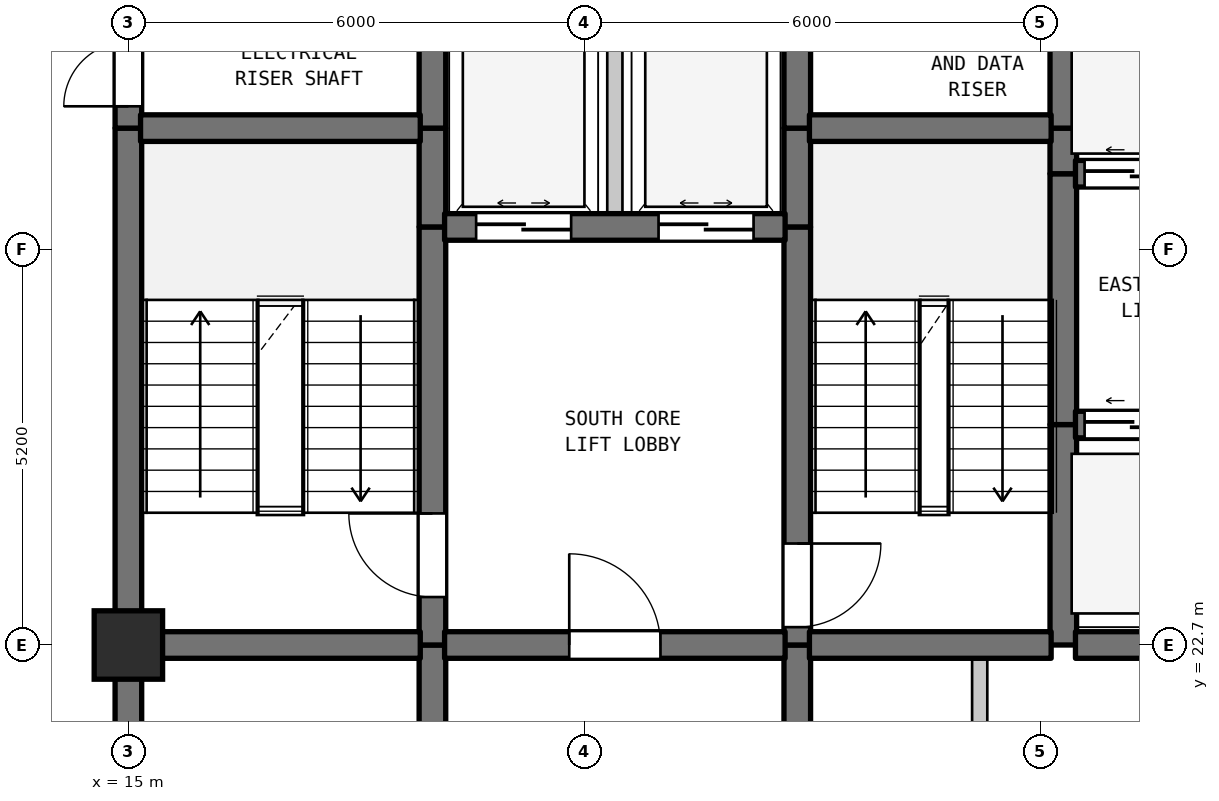
"""IFC4 building model, lengths in metres.
Left out: names, types, materials, properties, quantities, classifications, styles, units other than length and angle.
Written with IfcOpenShell. Run it as: python <this file> out.ifc"""

import sys

from ifc_helpers import new_model, si_unit, direction, frame, frame_2d, origin, origin_2d, place, context, subcontext, project, spatial, rectangle, extrude, element, fill, save


model = new_model("IFC4")
c1 = context("Model", 3, precision=1e-05, world=origin(), true_north=direction((0.0, 1.0)))
c2 = subcontext(c1, "Body", "Model", "MODEL_VIEW")
j1 = project(units=[si_unit("LENGTHUNIT", "METRE"), si_unit("PLANEANGLEUNIT", "RADIAN")], contexts=[c1])
p1 = place(None, origin())
s1 = spatial("IfcSite", under=j1, at=p1, CompositionType="ELEMENT")
p2 = place(p1, origin())
s2 = spatial("IfcBuilding", under=s1, at=p2, CompositionType="ELEMENT")
p3 = place(p2, frame((0.0, 0.0, 144.6)))
s3 = spatial("IfcBuildingStorey", under=s2, at=p3, CompositionType="ELEMENT", Elevation=144.6)
p4 = place(p3, frame((15.0, 22.7, 0.0), z_axis=(0.0, 0.0, 1.0), x_axis=(1.0, 0.0, 0.0)))
e1 = element("IfcColumn", 1, at=p4, inside=s3, PredefinedType="COLUMN", context=c2, shape_type="SweptSolid", body=[
    extrude(rectangle(XDim=0.9, YDim=0.9, at=origin_2d()), origin(), (0.0, 0.0, 1.0), 3.7),
])
p5 = place(p3, frame((15.0, 19.5, 0.0), z_axis=(0.0, 0.0, 1.0), x_axis=(0.0, 1.0, 0.0)))
e2 = element("IfcWall", 2, at=p5, inside=s3, PredefinedType="SHEAR", context=c2, shape_type="SweptSolid", body=[
    extrude(rectangle(XDim=3.2, YDim=0.35, at=frame_2d((1.6, 0.0))), origin(), (0.0, 0.0, 1.0), 3.385),
])
p6 = place(p3, frame((15.0, 22.7, 0.0), z_axis=(0.0, 0.0, 1.0), x_axis=(0.0, 1.0, 0.0)))
e3 = element("IfcWall", 3, at=p6, inside=s3, PredefinedType="SHEAR", context=c2, shape_type="SweptSolid", body=[
    extrude(rectangle(XDim=6.8, YDim=0.35, at=frame_2d((3.4, 0.0))), origin(), (0.0, 0.0, 1.0), 3.385),
])
p7 = place(p3, frame((15.0, 29.5, 0.0), z_axis=(0.0, 0.0, 1.0), x_axis=(0.0, 1.0, 0.0)))
e4 = element("IfcWall", 4, at=p7, inside=s3, PredefinedType="SHEAR", context=c2, shape_type="SweptSolid", body=[
    extrude(rectangle(XDim=1.6, YDim=0.35, at=frame_2d((0.8, 0.0))), origin(), (0.0, 0.0, 1.0), 3.385),
])
p8 = place(p7, frame((0.287, 0.0, 0.0)))
e5 = element("IfcOpeningElement", 5, at=p8, cuts=e4, PredefinedType="OPENING", context=c2, shape_type="SweptSolid", body=[
    extrude(rectangle(XDim=0.85, YDim=2.1, at=frame_2d((0.425, 1.05))), frame((0.0, 0.185, 0.0), z_axis=(0.0, -1.0, 0.0), x_axis=(1.0, 0.0, 0.0)), (0.0, 0.0, 1.0), 0.37),
])
p9 = place(p3, frame((19.0, 19.5, 0.0), z_axis=(0.0, 0.0, 1.0), x_axis=(0.0, 1.0, 0.0)))
e6 = element("IfcWall", 6, at=p9, inside=s3, PredefinedType="SHEAR", context=c2, shape_type="SweptSolid", body=[
    extrude(rectangle(XDim=3.2, YDim=0.35, at=frame_2d((1.6, 0.0))), origin(), (0.0, 0.0, 1.0), 3.385),
])
p10 = place(p3, frame((19.0, 22.7, 0.0), z_axis=(0.0, 0.0, 1.0), x_axis=(0.0, 1.0, 0.0)))
e7 = element("IfcWall", 7, at=p10, inside=s3, PredefinedType="SHEAR", context=c2, shape_type="SweptSolid", body=[
    extrude(rectangle(XDim=5.5, YDim=0.35, at=frame_2d((2.75, 0.0))), origin(), (0.0, 0.0, 1.0), 3.385),
])
p11 = place(p10, frame((0.631, 0.0, 0.0)))
e8 = element("IfcOpeningElement", 8, at=p11, cuts=e7, PredefinedType="OPENING", context=c2, shape_type="SweptSolid", body=[
    extrude(rectangle(XDim=1.1, YDim=2.15, at=frame_2d((0.55, 1.075))), frame((0.0, 0.185, 0.0), z_axis=(0.0, -1.0, 0.0), x_axis=(1.0, 0.0, 0.0)), (0.0, 0.0, 1.0), 0.37),
])
p12 = place(p3, frame((19.0, 28.2, 0.0), z_axis=(0.0, 0.0, 1.0), x_axis=(0.0, 1.0, 0.0)))
e9 = element("IfcWall", 9, at=p12, inside=s3, PredefinedType="SHEAR", context=c2, shape_type="SweptSolid", body=[
    extrude(rectangle(XDim=1.3, YDim=0.35, at=frame_2d((0.65, 0.0))), origin(), (0.0, 0.0, 1.0), 3.385),
])
p13 = place(p3, frame((19.0, 29.5, 0.0), z_axis=(0.0, 0.0, 1.0), x_axis=(0.0, 1.0, 0.0)))
e10 = element("IfcWall", 10, at=p13, inside=s3, PredefinedType="SHEAR", context=c2, shape_type="SweptSolid", body=[
    extrude(rectangle(XDim=5.5, YDim=0.35, at=frame_2d((2.75, 0.0))), origin(), (0.0, 0.0, 1.0), 3.385),
])
p14 = place(p13, frame((2.025, 0.0, 0.0)))
e11 = element("IfcOpeningElement", 11, at=p14, cuts=e10, PredefinedType="OPENING", context=c2, shape_type="SweptSolid", body=[
    extrude(rectangle(XDim=1.1, YDim=2.15, at=frame_2d((0.55, 1.075))), frame((0.0, 0.185, 0.0), z_axis=(0.0, -1.0, 0.0), x_axis=(1.0, 0.0, 0.0)), (0.0, 0.0, 1.0), 0.37),
])
p15 = place(p3, frame((21.4, 28.2, 0.0), z_axis=(0.0, 0.0, 1.0), x_axis=(0.0, 1.0, 0.0)))
e12 = element("IfcWall", 12, at=p15, inside=s3, PredefinedType="STANDARD", context=c2, shape_type="SweptSolid", body=[
    extrude(rectangle(XDim=2.6, YDim=0.2, at=frame_2d((1.3, 0.0))), origin(), (0.0, 0.0, 1.0), 3.385),
])
p16 = place(p3, frame((23.8, 19.5, 0.0), z_axis=(0.0, 0.0, 1.0), x_axis=(0.0, 1.0, 0.0)))
e13 = element("IfcWall", 13, at=p16, inside=s3, PredefinedType="SHEAR", context=c2, shape_type="SweptSolid", body=[
    extrude(rectangle(XDim=3.2, YDim=0.35, at=frame_2d((1.6, 0.0))), origin(), (0.0, 0.0, 1.0), 3.385),
])
p17 = place(p3, frame((23.8, 22.7, 0.0), z_axis=(0.0, 0.0, 1.0), x_axis=(0.0, 1.0, 0.0)))
e14 = element("IfcWall", 14, at=p17, inside=s3, PredefinedType="SHEAR", context=c2, shape_type="SweptSolid", body=[
    extrude(rectangle(XDim=5.5, YDim=0.35, at=frame_2d((2.75, 0.0))), origin(), (0.0, 0.0, 1.0), 3.385),
])
p18 = place(p17, frame((0.235, 0.0, 0.0)))
e15 = element("IfcOpeningElement", 15, at=p18, cuts=e14, PredefinedType="OPENING", context=c2, shape_type="SweptSolid", body=[
    extrude(rectangle(XDim=1.1, YDim=2.15, at=frame_2d((0.55, 1.075))), frame((0.0, 0.185, 0.0), z_axis=(0.0, -1.0, 0.0), x_axis=(1.0, 0.0, 0.0)), (0.0, 0.0, 1.0), 0.37),
])
for number, where, z_axis, x_axis in (
    (16, (23.8, 28.2, 0.0), (0.0, 0.0, 1.0), (0.0, 1.0, 0.0)),
    (17, (23.8, 29.5, 0.0), (0.0, 0.0, 1.0), (0.0, 1.0, 0.0)),
):
    element("IfcWall", number, at=place(p3, frame(where, z_axis=z_axis, x_axis=x_axis)), inside=s3, PredefinedType="SHEAR", context=c2, shape_type="SweptSolid", body=[
        extrude(rectangle(XDim=1.3, YDim=0.35, at=frame_2d((0.65, 0.0))), origin(), (0.0, 0.0, 1.0), 3.385),
    ])
p19 = place(p3, frame((26.2, 19.5, 0.0), z_axis=(0.0, 0.0, 1.0), x_axis=(0.0, 1.0, 0.0)))
e18 = element("IfcWall", 18, at=p19, inside=s3, PredefinedType="STANDARD", context=c2, shape_type="SweptSolid", body=[
    extrude(rectangle(XDim=3.2, YDim=0.2, at=frame_2d((1.6, 0.0))), origin(), (0.0, 0.0, 1.0), 3.385),
])
p20 = place(p3, frame((27.3, 22.7, 0.0), z_axis=(0.0, 0.0, 1.0), x_axis=(0.0, 1.0, 0.0)))
e19 = element("IfcWall", 19, at=p20, inside=s3, PredefinedType="SHEAR", context=c2, shape_type="SweptSolid", body=[
    extrude(rectangle(XDim=2.9, YDim=0.35, at=frame_2d((1.45, 0.0))), origin(), (0.0, 0.0, 1.0), 3.385),
])
p21 = place(p3, frame((27.3, 25.6, 0.0), z_axis=(0.0, 0.0, 1.0), x_axis=(0.0, 1.0, 0.0)))
e20 = element("IfcWall", 20, at=p21, inside=s3, PredefinedType="SHEAR", context=c2, shape_type="SweptSolid", body=[
    extrude(rectangle(XDim=3.3, YDim=0.35, at=frame_2d((1.65, 0.0))), origin(), (0.0, 0.0, 1.0), 3.385),
])
p22 = place(p3, frame((27.3, 28.9, 0.0), z_axis=(0.0, 0.0, 1.0), x_axis=(0.0, 1.0, 0.0)))
e21 = element("IfcWall", 21, at=p22, inside=s3, PredefinedType="SHEAR", context=c2, shape_type="SweptSolid", body=[
    extrude(rectangle(XDim=0.6, YDim=0.35, at=frame_2d((0.3, 0.0))), origin(), (0.0, 0.0, 1.0), 3.385),
])
p23 = place(p3, frame((27.3, 29.5, 0.0), z_axis=(0.0, 0.0, 1.0), x_axis=(0.0, 1.0, 0.0)))
e22 = element("IfcWall", 22, at=p23, inside=s3, PredefinedType="SHEAR", context=c2, shape_type="SweptSolid", body=[
    extrude(rectangle(XDim=2.0, YDim=0.35, at=frame_2d((1.0, 0.0))), origin(), (0.0, 0.0, 1.0), 3.385),
])
p24 = place(p3, frame((15.16, 22.7, 0.0), z_axis=(0.0, 0.0, 1.0), x_axis=(1.0, 0.0, 0.0)))
e23 = element("IfcWall", 23, at=p24, inside=s3, PredefinedType="SHEAR", context=c2, shape_type="SweptSolid", body=[
    extrude(rectangle(XDim=3.68, YDim=0.35, at=frame_2d((1.84, 0.0))), origin(), (0.0, 0.0, 1.0), 3.385),
])
p25 = place(p3, frame((19.16, 22.7, 0.0), z_axis=(0.0, 0.0, 1.0), x_axis=(1.0, 0.0, 0.0)))
e24 = element("IfcWall", 24, at=p25, inside=s3, PredefinedType="SHEAR", context=c2, shape_type="SweptSolid", body=[
    extrude(rectangle(XDim=4.48, YDim=0.35, at=frame_2d((2.24, 0.0))), origin(), (0.0, 0.0, 1.0), 3.385),
])
p26 = place(p25, frame((1.64, 0.0, 0.0)))
e25 = element("IfcOpeningElement", 25, at=p26, cuts=e24, PredefinedType="OPENING", context=c2, shape_type="SweptSolid", body=[
    extrude(rectangle(XDim=1.2, YDim=2.2, at=frame_2d((0.6, 1.1))), frame((0.0, 0.185, 0.0), z_axis=(0.0, -1.0, 0.0), x_axis=(1.0, 0.0, 0.0)), (0.0, 0.0, 1.0), 0.37),
])
p27 = place(p3, frame((23.96, 22.7, 0.0), z_axis=(0.0, 0.0, 1.0), x_axis=(1.0, 0.0, 0.0)))
e26 = element("IfcWall", 26, at=p27, inside=s3, PredefinedType="SHEAR", context=c2, shape_type="SweptSolid", body=[
    extrude(rectangle(XDim=3.18, YDim=0.35, at=frame_2d((1.59, 0.0))), origin(), (0.0, 0.0, 1.0), 3.385),
])
p28 = place(p3, frame((27.46, 22.7, 0.0), z_axis=(0.0, 0.0, 1.0), x_axis=(1.0, 0.0, 0.0)))
e27 = element("IfcWall", 27, at=p28, inside=s3, PredefinedType="SHEAR", context=c2, shape_type="SweptSolid", body=[
    extrude(rectangle(XDim=0.955, YDim=0.35, at=frame_2d((0.478, 0.0))), origin(), (0.0, 0.0, 1.0), 3.385),
])
p29 = place(p3, frame((27.46, 25.6, 0.0), z_axis=(0.0, 0.0, 1.0), x_axis=(1.0, 0.0, 0.0)))
e28 = element("IfcWall", 28, at=p29, inside=s3, PredefinedType="SHEAR", context=c2, shape_type="SweptSolid", body=[
    extrude(rectangle(XDim=3.18, YDim=0.35, at=frame_2d((1.59, 0.0))), origin(), (0.0, 0.0, 1.0), 3.385),
])
p30 = place(p29, frame((0.12, 0.0, 0.0)))
e29 = element("IfcOpeningElement", 29, at=p30, cuts=e28, PredefinedType="OPENING", context=c2, shape_type="SweptSolid", body=[
    extrude(rectangle(XDim=1.25, YDim=2.2, at=frame_2d((0.625, 1.1))), frame((0.0, 0.185, 0.0), z_axis=(0.0, -1.0, 0.0), x_axis=(1.0, 0.0, 0.0)), (0.0, 0.0, 1.0), 0.37),
])
p31 = place(p29, frame((1.81, 0.0, 0.0)))
e30 = element("IfcOpeningElement", 30, at=p31, cuts=e28, PredefinedType="OPENING", context=c2, shape_type="SweptSolid", body=[
    extrude(rectangle(XDim=1.25, YDim=2.2, at=frame_2d((0.625, 1.1))), frame((0.0, 0.185, 0.0), z_axis=(0.0, -1.0, 0.0), x_axis=(1.0, 0.0, 0.0)), (0.0, 0.0, 1.0), 0.37),
])
p32 = place(p3, frame((19.16, 28.2, 0.0), z_axis=(0.0, 0.0, 1.0), x_axis=(1.0, 0.0, 0.0)))
e31 = element("IfcWall", 31, at=p32, inside=s3, PredefinedType="SHEAR", context=c2, shape_type="SweptSolid", body=[
    extrude(rectangle(XDim=4.48, YDim=0.35, at=frame_2d((2.24, 0.0))), origin(), (0.0, 0.0, 1.0), 3.385),
])
p33 = place(p32, frame((0.415, 0.0, 0.0)))
e32 = element("IfcOpeningElement", 32, at=p33, cuts=e31, PredefinedType="OPENING", context=c2, shape_type="SweptSolid", body=[
    extrude(rectangle(XDim=1.25, YDim=2.2, at=frame_2d((0.625, 1.1))), frame((0.0, 0.185, 0.0), z_axis=(0.0, -1.0, 0.0), x_axis=(1.0, 0.0, 0.0)), (0.0, 0.0, 1.0), 0.37),
])
p34 = place(p32, frame((2.815, 0.0, 0.0)))
e33 = element("IfcOpeningElement", 33, at=p34, cuts=e31, PredefinedType="OPENING", context=c2, shape_type="SweptSolid", body=[
    extrude(rectangle(XDim=1.25, YDim=2.2, at=frame_2d((0.625, 1.1))), frame((0.0, 0.185, 0.0), z_axis=(0.0, -1.0, 0.0), x_axis=(1.0, 0.0, 0.0)), (0.0, 0.0, 1.0), 0.37),
])
p35 = place(p3, frame((27.46, 28.9, 0.0), z_axis=(0.0, 0.0, 1.0), x_axis=(1.0, 0.0, 0.0)))
e34 = element("IfcWall", 34, at=p35, inside=s3, PredefinedType="SHEAR", context=c2, shape_type="SweptSolid", body=[
    extrude(rectangle(XDim=3.18, YDim=0.35, at=frame_2d((1.59, 0.0))), origin(), (0.0, 0.0, 1.0), 3.385),
])
p36 = place(p35, frame((0.12, 0.0, 0.0)))
e35 = element("IfcOpeningElement", 35, at=p36, cuts=e34, PredefinedType="OPENING", context=c2, shape_type="SweptSolid", body=[
    extrude(rectangle(XDim=1.25, YDim=2.2, at=frame_2d((0.625, 1.1))), frame((0.0, 0.185, 0.0), z_axis=(0.0, -1.0, 0.0), x_axis=(1.0, 0.0, 0.0)), (0.0, 0.0, 1.0), 0.37),
])
p37 = place(p35, frame((1.81, 0.0, 0.0)))
e36 = element("IfcOpeningElement", 36, at=p37, cuts=e34, PredefinedType="OPENING", context=c2, shape_type="SweptSolid", body=[
    extrude(rectangle(XDim=1.25, YDim=2.2, at=frame_2d((0.625, 1.1))), frame((0.0, 0.185, 0.0), z_axis=(0.0, -1.0, 0.0), x_axis=(1.0, 0.0, 0.0)), (0.0, 0.0, 1.0), 0.37),
])
p38 = place(p3, frame((15.16, 29.5, 0.0), z_axis=(0.0, 0.0, 1.0), x_axis=(1.0, 0.0, 0.0)))
e37 = element("IfcWall", 37, at=p38, inside=s3, PredefinedType="SHEAR", context=c2, shape_type="SweptSolid", body=[
    extrude(rectangle(XDim=3.68, YDim=0.35, at=frame_2d((1.84, 0.0))), origin(), (0.0, 0.0, 1.0), 3.385),
])
p39 = place(p3, frame((23.96, 29.5, 0.0), z_axis=(0.0, 0.0, 1.0), x_axis=(1.0, 0.0, 0.0)))
e38 = element("IfcWall", 38, at=p39, inside=s3, PredefinedType="SHEAR", context=c2, shape_type="SweptSolid", body=[
    extrude(rectangle(XDim=3.18, YDim=0.35, at=frame_2d((1.59, 0.0))), origin(), (0.0, 0.0, 1.0), 3.385),
])
p40 = place(p8, origin())
e39 = element("IfcDoor", 39, at=p40, inside=s3, OperationType="SINGLE_SWING_LEFT", PredefinedType="DOOR", context=c2, shape_type="SweptSolid", body=[
    extrude(rectangle(XDim=0.85, YDim=2.1, at=frame_2d((0.425, 1.05))), frame((0.0, 0.025, 0.0), z_axis=(0.0, -1.0, 0.0), x_axis=(1.0, 0.0, 0.0)), (0.0, 0.0, 1.0), 0.05),
])
fill(e5, e39)
p41 = place(p11, origin())
e40 = element("IfcDoor", 40, at=p41, inside=s3, OperationType="SINGLE_SWING_RIGHT", PredefinedType="DOOR", context=c2, shape_type="SweptSolid", body=[
    extrude(rectangle(XDim=1.1, YDim=2.15, at=frame_2d((0.55, 1.075))), frame((0.0, 0.025, 0.0), z_axis=(0.0, -1.0, 0.0), x_axis=(1.0, 0.0, 0.0)), (0.0, 0.0, 1.0), 0.05),
])
fill(e8, e40)
p42 = place(p18, frame((1.1, 0.0, 0.0), z_axis=(0.0, 0.0, 1.0), x_axis=(-1.0, 0.0, 0.0)))
e41 = element("IfcDoor", 41, at=p42, inside=s3, OperationType="SINGLE_SWING_RIGHT", PredefinedType="DOOR", context=c2, shape_type="SweptSolid", body=[
    extrude(rectangle(XDim=1.1, YDim=2.15, at=frame_2d((0.55, 1.075))), frame((0.0, 0.025, 0.0), z_axis=(0.0, -1.0, 0.0), x_axis=(1.0, 0.0, 0.0)), (0.0, 0.0, 1.0), 0.05),
])
fill(e15, e41)
p43 = place(p26, origin())
e42 = element("IfcDoor", 42, at=p43, inside=s3, OperationType="SINGLE_SWING_LEFT", PredefinedType="DOOR", context=c2, shape_type="SweptSolid", body=[
    extrude(rectangle(XDim=1.2, YDim=2.2, at=frame_2d((0.6, 1.1))), frame((0.0, 0.025, 0.0), z_axis=(0.0, -1.0, 0.0), x_axis=(1.0, 0.0, 0.0)), (0.0, 0.0, 1.0), 0.05),
])
fill(e25, e42)
p44 = place(p30, origin())
e43 = element("IfcDoor", 43, at=p44, inside=s3, OperationType="DOUBLE_DOOR_SLIDING", PredefinedType="DOOR", context=c2, shape_type="SweptSolid", body=[
    extrude(rectangle(XDim=1.25, YDim=2.2, at=frame_2d((0.625, 1.1))), frame((0.0, 0.025, 0.0), z_axis=(0.0, -1.0, 0.0), x_axis=(1.0, 0.0, 0.0)), (0.0, 0.0, 1.0), 0.05),
])
fill(e29, e43)
p45 = place(p33, origin())
e44 = element("IfcDoor", 44, at=p45, inside=s3, OperationType="DOUBLE_DOOR_SLIDING", PredefinedType="DOOR", context=c2, shape_type="SweptSolid", body=[
    extrude(rectangle(XDim=1.25, YDim=2.2, at=frame_2d((0.625, 1.1))), frame((0.0, 0.025, 0.0), z_axis=(0.0, -1.0, 0.0), x_axis=(1.0, 0.0, 0.0)), (0.0, 0.0, 1.0), 0.05),
])
fill(e32, e44)
p46 = place(p34, origin())
e45 = element("IfcDoor", 45, at=p46, inside=s3, OperationType="DOUBLE_DOOR_SLIDING", PredefinedType="DOOR", context=c2, shape_type="SweptSolid", body=[
    extrude(rectangle(XDim=1.25, YDim=2.2, at=frame_2d((0.625, 1.1))), frame((0.0, 0.025, 0.0), z_axis=(0.0, -1.0, 0.0), x_axis=(1.0, 0.0, 0.0)), (0.0, 0.0, 1.0), 0.05),
])
fill(e33, e45)
p47 = place(p36, origin())
e46 = element("IfcDoor", 46, at=p47, inside=s3, OperationType="DOUBLE_DOOR_SLIDING", PredefinedType="DOOR", context=c2, shape_type="SweptSolid", body=[
    extrude(rectangle(XDim=1.25, YDim=2.2, at=frame_2d((0.625, 1.1))), frame((0.0, 0.025, 0.0), z_axis=(0.0, -1.0, 0.0), x_axis=(1.0, 0.0, 0.0)), (0.0, 0.0, 1.0), 0.05),
])
fill(e35, e46)
save(model, sys.argv[1])
